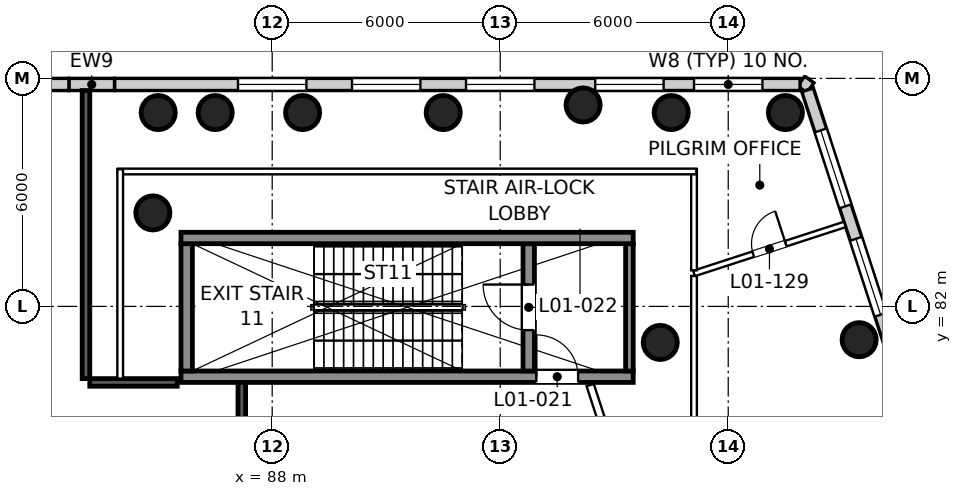
"""IFC4 building model, lengths in metres.
Left out: names, types, materials, properties, quantities, classifications, styles, units other than length and angle.
Written with IfcOpenShell. Run it as: python <this file> out.ifc"""

import sys

from ifc_helpers import new_model, si_unit, direction, frame, frame_2d, origin, origin_2d, place, context, subcontext, project, spatial, rectangle, circle, extrude, element, fill, save


model = new_model("IFC4")
c1 = context("Model", 3, precision=1e-05, world=origin(), true_north=direction((0.0, 1.0)))
c2 = subcontext(c1, "Body", "Model", "MODEL_VIEW")
j1 = project(units=[si_unit("LENGTHUNIT", "METRE"), si_unit("PLANEANGLEUNIT", "RADIAN")], contexts=[c1])
p1 = place(None, origin())
s1 = spatial("IfcSite", under=j1, at=p1, CompositionType="ELEMENT")
p2 = place(p1, origin())
s2 = spatial("IfcBuilding", under=s1, at=p2, CompositionType="ELEMENT")
p3 = place(p2, frame((0.0, 0.0, 9.0)))
s3 = spatial("IfcBuildingStorey", under=s2, at=p3, CompositionType="ELEMENT", Elevation=9.0)
for number, where, z_axis, x_axis in (
    (1, (84.86, 84.46, 0.0), (0.0, 0.0, 1.0), (1.0, 0.0, 0.0)),
    (2, (103.445, 81.124, 0.0), (0.0, 0.0, 1.0), (1.0, 0.0, 0.0)),
    (3, (101.504, 87.1, 0.0), (0.0, 0.0, 1.0), (1.0, 0.0, 0.0)),
    (4, (98.5, 87.1, 0.0), (0.0, 0.0, 1.0), (1.0, 0.0, 0.0)),
    (5, (92.5, 87.1, 0.0), (0.0, 0.0, 1.0), (1.0, 0.0, 0.0)),
    (6, (86.5, 87.1, 0.0), (0.0, 0.0, 1.0), (1.0, 0.0, 0.0)),
    (7, (98.211, 81.052, 0.0), (0.0, 0.0, 1.0), (1.0, 0.0, 0.0)),
    (8, (96.181, 87.3, 0.0), (0.0, 0.0, 1.0), (1.0, 0.0, 0.0)),
    (9, (88.8, 87.1, 0.0), (0.0, 0.0, 1.0), (1.0, 0.0, 0.0)),
    (10, (85.0, 87.1, 0.0), (0.0, 0.0, 1.0), (1.0, 0.0, 0.0)),
):
    element("IfcColumn", number, at=place(p3, frame(where, z_axis=z_axis, x_axis=x_axis)), inside=s3, PredefinedType="COLUMN", context=c2, shape_type="SweptSolid", body=[
        extrude(circle(Radius=0.45, at=origin_2d()), origin(), (0.0, 0.0, 1.0), 6.0),
    ])
p4 = place(p3, frame((102.163, 87.752, 0.0), z_axis=(0.0, 0.0, 1.0), x_axis=(-0.809087927272, 0.587687609145, 0.0)))
e11 = element("IfcWall", 11, at=p4, inside=s3, PredefinedType="SOLIDWALL", context=c2, shape_type="SweptSolid", body=[
    extrude(rectangle(XDim=0.3, YDim=0.32, at=frame_2d((0.15, 0.0))), origin(), (0.0, 0.0, 1.0), 5.65),
])
p5 = place(p3, frame((110.912, 60.539, 0.0), z_axis=(0.0, 0.0, 1.0), x_axis=(-0.309016476183, 0.951056684666, 0.0)))
e12 = element("IfcWall", 12, at=p5, inside=s3, PredefinedType="SOLIDWALL", context=c2, shape_type="SweptSolid", body=[
    extrude(rectangle(XDim=28.556, YDim=0.32, at=frame_2d((14.278, 0.0))), origin(), (0.0, 0.0, 1.0), 5.65),
])
p6 = place(p5, frame((1.335, 0.0, 0.9)))
e13 = element("IfcOpeningElement", 13, at=p6, cuts=e12, PredefinedType="OPENING", context=c2, shape_type="SweptSolid", body=[
    extrude(rectangle(XDim=2.1, YDim=3.0, at=frame_2d((1.05, 1.5))), frame((0.0, 0.17, 0.0), z_axis=(0.0, -1.0, 0.0), x_axis=(1.0, 0.0, 0.0)), (0.0, 0.0, 1.0), 0.34),
])
p7 = place(p5, frame((4.335, 0.0, 0.9)))
e14 = element("IfcOpeningElement", 14, at=p7, cuts=e12, PredefinedType="OPENING", context=c2, shape_type="SweptSolid", body=[
    extrude(rectangle(XDim=2.1, YDim=3.0, at=frame_2d((1.05, 1.5))), frame((0.0, 0.17, 0.0), z_axis=(0.0, -1.0, 0.0), x_axis=(1.0, 0.0, 0.0)), (0.0, 0.0, 1.0), 0.34),
])
p8 = place(p5, frame((7.335, 0.0, 0.9)))
e15 = element("IfcOpeningElement", 15, at=p8, cuts=e12, PredefinedType="OPENING", context=c2, shape_type="SweptSolid", body=[
    extrude(rectangle(XDim=2.1, YDim=3.0, at=frame_2d((1.05, 1.5))), frame((0.0, 0.17, 0.0), z_axis=(0.0, -1.0, 0.0), x_axis=(1.0, 0.0, 0.0)), (0.0, 0.0, 1.0), 0.34),
])
p9 = place(p5, frame((10.335, 0.0, 0.9)))
e16 = element("IfcOpeningElement", 16, at=p9, cuts=e12, PredefinedType="OPENING", context=c2, shape_type="SweptSolid", body=[
    extrude(rectangle(XDim=2.1, YDim=3.0, at=frame_2d((1.05, 1.5))), frame((0.0, 0.17, 0.0), z_axis=(0.0, -1.0, 0.0), x_axis=(1.0, 0.0, 0.0)), (0.0, 0.0, 1.0), 0.34),
])
p10 = place(p5, frame((13.335, 0.0, 0.9)))
e17 = element("IfcOpeningElement", 17, at=p10, cuts=e12, PredefinedType="OPENING", context=c2, shape_type="SweptSolid", body=[
    extrude(rectangle(XDim=2.1, YDim=3.0, at=frame_2d((1.05, 1.5))), frame((0.0, 0.17, 0.0), z_axis=(0.0, -1.0, 0.0), x_axis=(1.0, 0.0, 0.0)), (0.0, 0.0, 1.0), 0.34),
])
p11 = place(p5, frame((16.335, 0.0, 0.9)))
e18 = element("IfcOpeningElement", 18, at=p11, cuts=e12, PredefinedType="OPENING", context=c2, shape_type="SweptSolid", body=[
    extrude(rectangle(XDim=2.1, YDim=3.0, at=frame_2d((1.05, 1.5))), frame((0.0, 0.17, 0.0), z_axis=(0.0, -1.0, 0.0), x_axis=(1.0, 0.0, 0.0)), (0.0, 0.0, 1.0), 0.34),
])
p12 = place(p5, frame((19.335, 0.0, 0.9)))
e19 = element("IfcOpeningElement", 19, at=p12, cuts=e12, PredefinedType="OPENING", context=c2, shape_type="SweptSolid", body=[
    extrude(rectangle(XDim=2.1, YDim=3.0, at=frame_2d((1.05, 1.5))), frame((0.0, 0.17, 0.0), z_axis=(0.0, -1.0, 0.0), x_axis=(1.0, 0.0, 0.0)), (0.0, 0.0, 1.0), 0.34),
])
p13 = place(p5, frame((22.335, 0.0, 0.9)))
e20 = element("IfcOpeningElement", 20, at=p13, cuts=e12, PredefinedType="OPENING", context=c2, shape_type="SweptSolid", body=[
    extrude(rectangle(XDim=2.1, YDim=3.0, at=frame_2d((1.05, 1.5))), frame((0.0, 0.17, 0.0), z_axis=(0.0, -1.0, 0.0), x_axis=(1.0, 0.0, 0.0)), (0.0, 0.0, 1.0), 0.34),
])
p14 = place(p5, frame((25.335, 0.0, 0.9)))
e21 = element("IfcOpeningElement", 21, at=p14, cuts=e12, PredefinedType="OPENING", context=c2, shape_type="SweptSolid", body=[
    extrude(rectangle(XDim=2.1, YDim=3.0, at=frame_2d((1.05, 1.5))), frame((0.0, 0.17, 0.0), z_axis=(0.0, -1.0, 0.0), x_axis=(1.0, 0.0, 0.0)), (0.0, 0.0, 1.0), 0.34),
])
p15 = place(p3, frame((101.891, 87.84, 0.0), z_axis=(0.0, 0.0, 1.0), x_axis=(-1.0, 0.0, 0.0)))
e22 = element("IfcWall", 22, at=p15, inside=s3, PredefinedType="SOLIDWALL", context=c2, shape_type="SweptSolid", body=[
    extrude(rectangle(XDim=18.041, YDim=0.32, at=frame_2d((9.021, 0.0))), origin(), (0.0, 0.0, 1.0), 5.65),
])
p16 = place(p15, frame((0.991, 0.0, 0.9)))
e23 = element("IfcOpeningElement", 23, at=p16, cuts=e22, PredefinedType="OPENING", context=c2, shape_type="SweptSolid", body=[
    extrude(rectangle(XDim=1.8, YDim=2.1, at=frame_2d((0.9, 1.05))), frame((0.0, 0.17, 0.0), z_axis=(0.0, -1.0, 0.0), x_axis=(1.0, 0.0, 0.0)), (0.0, 0.0, 1.0), 0.34),
])
p17 = place(p15, frame((3.591, 0.0, 0.9)))
e24 = element("IfcOpeningElement", 24, at=p17, cuts=e22, PredefinedType="OPENING", context=c2, shape_type="SweptSolid", body=[
    extrude(rectangle(XDim=1.8, YDim=2.1, at=frame_2d((0.9, 1.05))), frame((0.0, 0.17, 0.0), z_axis=(0.0, -1.0, 0.0), x_axis=(1.0, 0.0, 0.0)), (0.0, 0.0, 1.0), 0.34),
])
p18 = place(p15, frame((6.991, 0.0, 0.9)))
e25 = element("IfcOpeningElement", 25, at=p18, cuts=e22, PredefinedType="OPENING", context=c2, shape_type="SweptSolid", body=[
    extrude(rectangle(XDim=1.8, YDim=2.1, at=frame_2d((0.9, 1.05))), frame((0.0, 0.17, 0.0), z_axis=(0.0, -1.0, 0.0), x_axis=(1.0, 0.0, 0.0)), (0.0, 0.0, 1.0), 0.34),
])
p19 = place(p15, frame((9.991, 0.0, 0.9)))
e26 = element("IfcOpeningElement", 26, at=p19, cuts=e22, PredefinedType="OPENING", context=c2, shape_type="SweptSolid", body=[
    extrude(rectangle(XDim=1.8, YDim=2.1, at=frame_2d((0.9, 1.05))), frame((0.0, 0.17, 0.0), z_axis=(0.0, -1.0, 0.0), x_axis=(1.0, 0.0, 0.0)), (0.0, 0.0, 1.0), 0.34),
])
p20 = place(p15, frame((12.991, 0.0, 0.9)))
e27 = element("IfcOpeningElement", 27, at=p20, cuts=e22, PredefinedType="OPENING", context=c2, shape_type="SweptSolid", body=[
    extrude(rectangle(XDim=1.8, YDim=2.1, at=frame_2d((0.9, 1.05))), frame((0.0, 0.17, 0.0), z_axis=(0.0, -1.0, 0.0), x_axis=(1.0, 0.0, 0.0)), (0.0, 0.0, 1.0), 0.34),
])
p21 = place(p3, frame((83.851, 87.84, 0.0), z_axis=(0.0, 0.0, 1.0), x_axis=(-1.0, 0.0, 0.0)))
e28 = element("IfcWall", 28, at=p21, inside=s3, PredefinedType="SOLIDWALL", context=c2, shape_type="SweptSolid", body=[
    extrude(rectangle(XDim=1.2, YDim=0.32, at=frame_2d((0.6, 0.0))), origin(), (0.0, 0.0, 1.0), 5.65),
])
p22 = place(p3, frame((82.65, 87.84, 0.0), z_axis=(0.0, 0.0, 1.0), x_axis=(-1.0, 0.0, 0.0)))
e29 = element("IfcWall", 29, at=p22, inside=s3, PredefinedType="SOLIDWALL", context=c2, shape_type="SweptSolid", body=[
    extrude(rectangle(XDim=1.65, YDim=0.32, at=frame_2d((0.825, 0.0))), origin(), (0.0, 0.0, 1.0), 5.65),
])
p23 = place(p3, frame((85.6, 80.15, 0.0), z_axis=(0.0, 0.0, 1.0), x_axis=(1.0, 0.0, 0.0)))
e30 = element("IfcWall", 30, at=p23, inside=s3, PredefinedType="SHEAR", context=c2, shape_type="SweptSolid", body=[
    extrude(rectangle(XDim=11.9, YDim=0.3, at=frame_2d((5.95, 0.0))), origin(), (0.0, 0.0, 1.0), 6.0),
])
p24 = place(p23, frame((9.35, 0.0, 0.0)))
e31 = element("IfcOpeningElement", 31, at=p24, cuts=e30, PredefinedType="OPENING", context=c2, shape_type="SweptSolid", body=[
    extrude(rectangle(XDim=1.1, YDim=2.1, at=frame_2d((0.55, 1.05))), frame((0.0, 0.16, 0.0), z_axis=(0.0, -1.0, 0.0), x_axis=(1.0, 0.0, 0.0)), (0.0, 0.0, 1.0), 0.32),
])
p25 = place(p3, frame((85.75, 80.3, 0.0), z_axis=(0.0, 0.0, 1.0), x_axis=(0.0, 1.0, 0.0)))
e32 = element("IfcWall", 32, at=p25, inside=s3, PredefinedType="SHEAR", context=c2, shape_type="SweptSolid", body=[
    extrude(rectangle(XDim=3.35, YDim=0.3, at=frame_2d((1.675, 0.0))), origin(), (0.0, 0.0, 1.0), 6.0),
])
p26 = place(p3, frame((94.75, 80.3, 0.0), z_axis=(0.0, 0.0, 1.0), x_axis=(0.0, 1.0, 0.0)))
e33 = element("IfcWall", 33, at=p26, inside=s3, PredefinedType="SHEAR", context=c2, shape_type="SweptSolid", body=[
    extrude(rectangle(XDim=3.35, YDim=0.3, at=frame_2d((1.675, 0.0))), origin(), (0.0, 0.0, 1.0), 6.0),
])
p27 = place(p26, frame((1.075, 0.0, 0.0)))
e34 = element("IfcOpeningElement", 34, at=p27, cuts=e33, PredefinedType="OPENING", context=c2, shape_type="SweptSolid", body=[
    extrude(rectangle(XDim=1.2, YDim=2.1, at=frame_2d((0.6, 1.05))), frame((0.0, 0.16, 0.0), z_axis=(0.0, -1.0, 0.0), x_axis=(1.0, 0.0, 0.0)), (0.0, 0.0, 1.0), 0.32),
])
p28 = place(p3, frame((97.4, 80.3, 0.0), z_axis=(0.0, 0.0, 1.0), x_axis=(0.0, 1.0, 0.0)))
e35 = element("IfcWall", 35, at=p28, inside=s3, PredefinedType="SHEAR", context=c2, shape_type="SweptSolid", body=[
    extrude(rectangle(XDim=3.35, YDim=0.2, at=frame_2d((1.675, 0.0))), origin(), (0.0, 0.0, 1.0), 6.0),
])
p29 = place(p3, frame((85.6, 83.8, 0.0), z_axis=(0.0, 0.0, 1.0), x_axis=(1.0, 0.0, 0.0)))
e36 = element("IfcWall", 36, at=p29, inside=s3, PredefinedType="SHEAR", context=c2, shape_type="SweptSolid", body=[
    extrude(rectangle(XDim=11.9, YDim=0.3, at=frame_2d((5.95, 0.0))), origin(), (0.0, 0.0, 1.0), 6.0),
])
p30 = place(p3, frame((83.1, 87.68, 0.0), z_axis=(0.0, 0.0, 1.0), x_axis=(0.0, -1.0, 0.0)))
e37 = element("IfcWall", 37, at=p30, inside=s3, PredefinedType="PARTITIONING", context=c2, shape_type="SweptSolid", body=[
    extrude(rectangle(XDim=7.58, YDim=0.2, at=frame_2d((3.79, 0.0))), origin(), (0.0, 0.0, 1.0), 5.65),
])
p31 = place(p3, frame((83.2, 80.0, 0.0), z_axis=(0.0, 0.0, 1.0), x_axis=(1.0, 0.0, 0.0)))
e38 = element("IfcWall", 38, at=p31, inside=s3, PredefinedType="PARTITIONING", context=c2, shape_type="SweptSolid", body=[
    extrude(rectangle(XDim=2.301, YDim=0.2, at=frame_2d((1.15, 0.0))), origin(), (0.0, 0.0, 1.0), 5.65),
])
p32 = place(p3, frame((96.368, 79.931, 0.0), z_axis=(0.0, 0.0, 1.0), x_axis=(0.309014892187, -0.951057199335, 0.0)))
e39 = element("IfcWall", 39, at=p32, inside=s3, PredefinedType="PARTITIONING", context=c2, shape_type="SweptSolid", body=[
    extrude(rectangle(XDim=18.769, YDim=0.2, at=frame_2d((9.384, 0.0))), origin(), (0.0, 0.0, 1.0), 5.65),
])
p33 = place(p32, frame((14.029, 0.0, 0.0)))
e40 = element("IfcOpeningElement", 40, at=p33, cuts=e39, PredefinedType="OPENING", context=c2, shape_type="SweptSolid", body=[
    extrude(rectangle(XDim=0.9, YDim=2.1, at=frame_2d((0.45, 1.05))), frame((0.0, 0.11, 0.0), z_axis=(0.0, -1.0, 0.0), x_axis=(1.0, 0.0, 0.0)), (0.0, 0.0, 1.0), 0.22),
])
p34 = place(p32, frame((4.54, 0.0, 0.0)))
e41 = element("IfcOpeningElement", 41, at=p34, cuts=e39, PredefinedType="OPENING", context=c2, shape_type="SweptSolid", body=[
    extrude(rectangle(XDim=0.9, YDim=2.1, at=frame_2d((0.45, 1.05))), frame((0.0, 0.11, 0.0), z_axis=(0.0, -1.0, 0.0), x_axis=(1.0, 0.0, 0.0)), (0.0, 0.0, 1.0), 0.22),
])
p35 = place(p3, frame((103.07, 84.157, 0.0), z_axis=(0.0, 0.0, 1.0), x_axis=(-0.951059855583, -0.309006716915, 0.0)))
e42 = element("IfcWall", 42, at=p35, inside=s3, PredefinedType="PARTITIONING", context=c2, shape_type="SweptSolid", body=[
    extrude(rectangle(XDim=4.174, YDim=0.15, at=frame_2d((2.087, 0.0))), origin(), (0.0, 0.0, 1.0), 4.95),
])
p36 = place(p35, frame((1.637, 0.0, 0.0)))
e43 = element("IfcOpeningElement", 43, at=p36, cuts=e42, PredefinedType="OPENING", context=c2, shape_type="SweptSolid", body=[
    extrude(rectangle(XDim=0.9, YDim=2.1, at=frame_2d((0.45, 1.05))), frame((0.0, 0.085, 0.0), z_axis=(0.0, -1.0, 0.0), x_axis=(1.0, 0.0, 0.0)), (0.0, 0.0, 1.0), 0.17),
])
p37 = place(p3, frame((87.2, 80.0, 0.0), z_axis=(0.0, 0.0, 1.0), x_axis=(0.0, -1.0, 0.0)))
e44 = element("IfcWall", 44, at=p37, inside=s3, PredefinedType="PARTITIONING", context=c2, shape_type="SweptSolid", body=[
    extrude(rectangle(XDim=15.125, YDim=0.2, at=frame_2d((7.562, 0.0))), origin(), (0.0, 0.0, 1.0), 5.65),
])
p38 = place(p37, frame((3.637, 0.0, 0.0)))
e45 = element("IfcOpeningElement", 45, at=p38, cuts=e44, PredefinedType="OPENING", context=c2, shape_type="SweptSolid", body=[
    extrude(rectangle(XDim=1.8, YDim=2.1, at=frame_2d((0.9, 1.05))), frame((0.0, 0.11, 0.0), z_axis=(0.0, -1.0, 0.0), x_axis=(1.0, 0.0, 0.0)), (0.0, 0.0, 1.0), 0.22),
])
p39 = place(p37, frame((9.688, 0.0, 0.0)))
e46 = element("IfcOpeningElement", 46, at=p39, cuts=e44, PredefinedType="OPENING", context=c2, shape_type="SweptSolid", body=[
    extrude(rectangle(XDim=1.8, YDim=2.1, at=frame_2d((0.9, 1.05))), frame((0.0, 0.11, 0.0), z_axis=(0.0, -1.0, 0.0), x_axis=(1.0, 0.0, 0.0)), (0.0, 0.0, 1.0), 0.22),
])
p40 = place(p3, frame((99.1, 82.949, 0.0), z_axis=(0.0, 0.0, 1.0), x_axis=(0.0, 1.0, 0.0)))
e47 = element("IfcWall", 47, at=p40, inside=s3, PredefinedType="PARTITIONING", context=c2, shape_type="SweptSolid", body=[
    extrude(rectangle(XDim=2.661, YDim=0.15, at=frame_2d((1.331, 0.0))), origin(), (0.0, 0.0, 1.0), 5.65),
])
p41 = place(p3, frame((99.16, 85.55, 0.0), z_axis=(0.0, 0.0, 1.0), x_axis=(-1.0, 0.0, 0.0)))
e48 = element("IfcWall", 48, at=p41, inside=s3, PredefinedType="PARTITIONING", context=c2, shape_type="SweptSolid", body=[
    extrude(rectangle(XDim=15.22, YDim=0.15, at=frame_2d((7.61, 0.0))), origin(), (0.0, 0.0, 1.0), 4.95),
])
p42 = place(p3, frame((84.0, 85.61, 0.0), z_axis=(0.0, 0.0, 1.0), x_axis=(0.0, -1.0, 0.0)))
e49 = element("IfcWall", 49, at=p42, inside=s3, PredefinedType="PARTITIONING", context=c2, shape_type="SweptSolid", body=[
    extrude(rectangle(XDim=5.51, YDim=0.15, at=frame_2d((2.755, 0.0))), origin(), (0.0, 0.0, 1.0), 5.65),
])
p43 = place(p3, frame((99.1, 78.34, 0.0), z_axis=(0.0, 0.0, 1.0), x_axis=(0.0, 1.0, 0.0)))
e50 = element("IfcWall", 50, at=p43, inside=s3, PredefinedType="PARTITIONING", context=c2, shape_type="SweptSolid", body=[
    extrude(rectangle(XDim=4.46, YDim=0.15, at=frame_2d((2.23, 0.0))), origin(), (0.0, 0.0, 1.0), 4.95),
])
p44 = place(p13, origin())
e51 = element("IfcWindow", 51, at=p44, inside=s3, PartitioningType="SINGLE_PANEL", PredefinedType="WINDOW", context=c2, shape_type="SweptSolid", body=[
    extrude(rectangle(XDim=2.1, YDim=3.0, at=frame_2d((1.05, 1.5))), frame((0.0, 0.07, 0.0), z_axis=(0.0, -1.0, 0.0), x_axis=(1.0, 0.0, 0.0)), (0.0, 0.0, 1.0), 0.06),
])
fill(e20, e51)
p45 = place(p14, origin())
e52 = element("IfcWindow", 52, at=p45, inside=s3, PartitioningType="SINGLE_PANEL", PredefinedType="WINDOW", context=c2, shape_type="SweptSolid", body=[
    extrude(rectangle(XDim=2.1, YDim=3.0, at=frame_2d((1.05, 1.5))), frame((0.0, 0.07, 0.0), z_axis=(0.0, -1.0, 0.0), x_axis=(1.0, 0.0, 0.0)), (0.0, 0.0, 1.0), 0.06),
])
fill(e21, e52)
p46 = place(p16, origin())
e53 = element("IfcWindow", 53, at=p46, inside=s3, PartitioningType="SINGLE_PANEL", PredefinedType="WINDOW", context=c2, shape_type="SweptSolid", body=[
    extrude(rectangle(XDim=1.8, YDim=2.1, at=frame_2d((0.9, 1.05))), frame((0.0, 0.07, 0.0), z_axis=(0.0, -1.0, 0.0), x_axis=(1.0, 0.0, 0.0)), (0.0, 0.0, 1.0), 0.06),
])
fill(e23, e53)
p47 = place(p17, origin())
e54 = element("IfcWindow", 54, at=p47, inside=s3, PartitioningType="SINGLE_PANEL", PredefinedType="WINDOW", context=c2, shape_type="SweptSolid", body=[
    extrude(rectangle(XDim=1.8, YDim=2.1, at=frame_2d((0.9, 1.05))), frame((0.0, 0.07, 0.0), z_axis=(0.0, -1.0, 0.0), x_axis=(1.0, 0.0, 0.0)), (0.0, 0.0, 1.0), 0.06),
])
fill(e24, e54)
p48 = place(p18, origin())
e55 = element("IfcWindow", 55, at=p48, inside=s3, PartitioningType="SINGLE_PANEL", PredefinedType="WINDOW", context=c2, shape_type="SweptSolid", body=[
    extrude(rectangle(XDim=1.8, YDim=2.1, at=frame_2d((0.9, 1.05))), frame((0.0, 0.07, 0.0), z_axis=(0.0, -1.0, 0.0), x_axis=(1.0, 0.0, 0.0)), (0.0, 0.0, 1.0), 0.06),
])
fill(e25, e55)
p49 = place(p19, origin())
e56 = element("IfcWindow", 56, at=p49, inside=s3, PartitioningType="SINGLE_PANEL", PredefinedType="WINDOW", context=c2, shape_type="SweptSolid", body=[
    extrude(rectangle(XDim=1.8, YDim=2.1, at=frame_2d((0.9, 1.05))), frame((0.0, 0.07, 0.0), z_axis=(0.0, -1.0, 0.0), x_axis=(1.0, 0.0, 0.0)), (0.0, 0.0, 1.0), 0.06),
])
fill(e26, e56)
p50 = place(p20, origin())
e57 = element("IfcWindow", 57, at=p50, inside=s3, PartitioningType="SINGLE_PANEL", PredefinedType="WINDOW", context=c2, shape_type="SweptSolid", body=[
    extrude(rectangle(XDim=1.8, YDim=2.1, at=frame_2d((0.9, 1.05))), frame((0.0, 0.07, 0.0), z_axis=(0.0, -1.0, 0.0), x_axis=(1.0, 0.0, 0.0)), (0.0, 0.0, 1.0), 0.06),
])
fill(e27, e57)
p51 = place(p24, origin())
e58 = element("IfcDoor", 58, at=p51, inside=s3, OperationType="SINGLE_SWING_LEFT", PredefinedType="DOOR", context=c2, shape_type="SweptSolid", body=[
    extrude(rectangle(XDim=1.1, YDim=2.1, at=frame_2d((0.55, 1.05))), frame((0.0, 0.025, 0.0), z_axis=(0.0, -1.0, 0.0), x_axis=(1.0, 0.0, 0.0)), (0.0, 0.0, 1.0), 0.05),
])
fill(e31, e58)
p52 = place(p27, origin())
e59 = element("IfcDoor", 59, at=p52, inside=s3, OperationType="SINGLE_SWING_RIGHT", PredefinedType="DOOR", context=c2, shape_type="SweptSolid", body=[
    extrude(rectangle(XDim=1.2, YDim=2.1, at=frame_2d((0.6, 1.05))), frame((0.0, 0.025, 0.0), z_axis=(0.0, -1.0, 0.0), x_axis=(1.0, 0.0, 0.0)), (0.0, 0.0, 1.0), 0.05),
])
fill(e34, e59)
p53 = place(p36, frame((0.9, 0.0, 0.0), z_axis=(0.0, 0.0, 1.0), x_axis=(-1.0, 0.0, 0.0)))
e60 = element("IfcDoor", 60, at=p53, inside=s3, OperationType="SINGLE_SWING_RIGHT", PredefinedType="DOOR", context=c2, shape_type="SweptSolid", body=[
    extrude(rectangle(XDim=0.9, YDim=2.1, at=frame_2d((0.45, 1.05))), frame((0.0, 0.025, 0.0), z_axis=(0.0, -1.0, 0.0), x_axis=(1.0, 0.0, 0.0)), (0.0, 0.0, 1.0), 0.05),
])
fill(e43, e60)
save(model, sys.argv[1])
